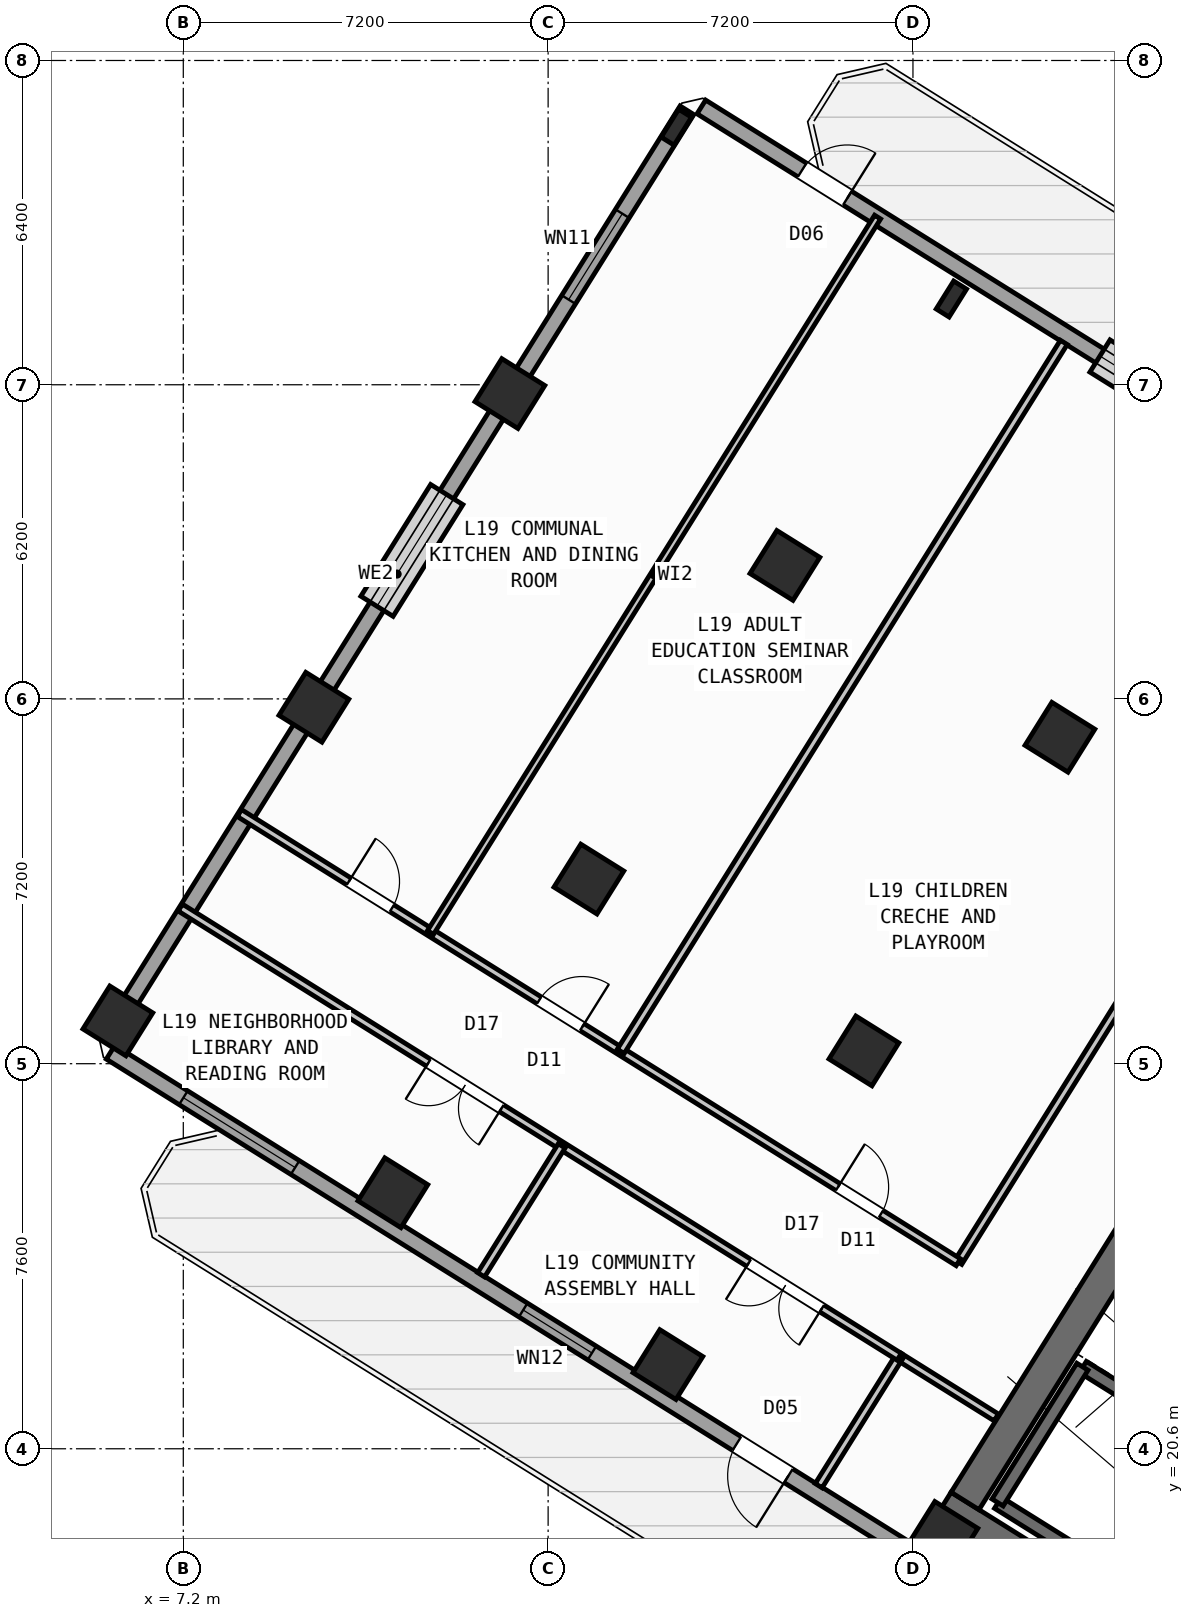
"""IFC4 building model, lengths in metres.
Left out: names, types, materials, properties, quantities, classifications, styles, units other than length and angle.
Written with IfcOpenShell. Run it as: python <this file> out.ifc"""

import sys

from ifc_helpers import new_model, si_unit, direction, frame, frame_2d, origin, origin_2d, place, context, subcontext, project, spatial, rectangle, hollow_rectangle, i_section, extrude, source, transform, mapped, element, fill, save


model = new_model("IFC4")
c1 = context("Model", 3, precision=1e-05, world=origin(), true_north=direction((0.0, 1.0)))
c2 = subcontext(c1, "Body", "Model", "MODEL_VIEW")
j1 = project(units=[si_unit("LENGTHUNIT", "METRE"), si_unit("PLANEANGLEUNIT", "RADIAN")], contexts=[c1])
p1 = place(None, origin())
s1 = spatial("IfcSite", under=j1, at=p1, CompositionType="ELEMENT")
p2 = place(p1, origin())
s2 = spatial("IfcBuilding", under=s1, at=p2, CompositionType="ELEMENT")
p3 = place(p2, frame((0.0, 0.0, 76.5)))
s3 = spatial("IfcBuildingStorey", under=s2, at=p3, CompositionType="ELEMENT", Elevation=76.5)
p4 = place(p3, frame((33.409, 12.45, 0.0), z_axis=(0.0, 0.0, 1.0), x_axis=(-0.848051132073, 0.529914405721, 0.0)))
e1 = element("IfcWall", 1, at=p4, inside=s3, PredefinedType="SHEAR", context=c2, shape_type="SweptSolid", body=[
    extrude(rectangle(XDim=13.24, YDim=0.65, at=frame_2d((6.62, 0.0))), origin(), (0.0, 0.0, 1.0), 4.25),
])
p5 = place(p3, frame((26.007, 24.976, 0.0), z_axis=(0.0, 0.0, 1.0), x_axis=(-0.529916319127, -0.848049936456, 0.0)))
e2 = element("IfcWall", 2, at=p5, inside=s3, PredefinedType="SHEAR", context=c2, shape_type="SweptSolid", body=[
    extrude(rectangle(XDim=6.375, YDim=0.65, at=frame_2d((3.188, 0.0))), origin(), (0.0, 0.0, 1.0), 4.25),
])
m1 = source(origin(), c2, "Body", "SweptSolid", [
    extrude(hollow_rectangle(XDim=1.0, YDim=1.0, WallThickness=0.04, at=origin_2d()), origin(), (0.0, 0.0, 1.0), 4.5),
])
for number, where, z_axis, x_axis in (
    (3, (22.191, 18.87, 0.0), (0.0, 0.0, 1.0), (-0.848, 0.53, 0.0)),
    (4, (24.5, 34.643, 0.0), (0.0, 0.0, 1.0), (-0.848, 0.53, 0.0)),
    (5, (20.632, 28.452, 0.0), (0.0, 0.0, 1.0), (-0.848, 0.53, 0.0)),
    (6, (16.764, 22.261, 0.0), (0.0, 0.0, 1.0), (-0.848, 0.53, 0.0)),
):
    element("IfcColumn", number, at=place(p3, frame(where, z_axis=z_axis, x_axis=x_axis)), inside=s3, PredefinedType="COLUMN", context=c2, shape_type="MappedRepresentation", body=[
        mapped(m1, transform((0.0, 0.0, 0.0), scale=1.0)),
    ])
m2 = source(origin(), c2, "Body", "SweptSolid", [
    extrude(i_section(OverallWidth=0.3, OverallDepth=0.65, WebThickness=0.016, FlangeThickness=0.031, at=origin_2d()), origin(), (0.0, 0.0, 1.0), 4.5),
])
p6 = place(p3, frame((22.358, 43.292, 0.0), z_axis=(0.0, 0.0, 1.0), x_axis=(-0.848048096156, 0.529919264233, 0.0)))
e7 = element("IfcColumn", 7, at=p6, inside=s3, PredefinedType="COLUMN", context=c2, shape_type="MappedRepresentation", body=[
    mapped(m2, transform((0.0, 0.0, 0.0), scale=1.0)),
])
for number, where, z_axis, x_axis in (
    (8, (19.073, 38.034, 0.0), (0.0, 0.0, 1.0), (-0.848, 0.53, 0.0)),
    (9, (15.205, 31.844, 0.0), (0.0, 0.0, 1.0), (-0.848, 0.53, 0.0)),
    (10, (11.336, 25.653, 0.0), (0.0, 0.0, 1.0), (-0.848, 0.53, 0.0)),
):
    element("IfcColumn", number, at=place(p3, frame(where, z_axis=z_axis, x_axis=x_axis)), inside=s3, PredefinedType="COLUMN", context=c2, shape_type="MappedRepresentation", body=[
        mapped(m1, transform((0.0, 0.0, 0.0), scale=1.0)),
    ])
p7 = place(p3, frame((16.931, 46.684, 0.0), z_axis=(0.0, 0.0, 1.0), x_axis=(-0.848048096156, 0.529919264233, 0.0)))
e11 = element("IfcColumn", 11, at=p7, inside=s3, PredefinedType="COLUMN", context=c2, shape_type="MappedRepresentation", body=[
    mapped(m2, transform((0.0, 0.0, 0.0), scale=1.0)),
])
for number, where, z_axis, x_axis in (
    (12, (13.646, 41.426, 0.0), (0.0, 0.0, 1.0), (-0.848, 0.53, 0.0)),
    (13, (9.777, 35.235, 0.0), (0.0, 0.0, 1.0), (-0.848, 0.53, 0.0)),
    (14, (5.909, 29.044, 0.0), (0.0, 0.0, 1.0), (-0.848, 0.53, 0.0)),
):
    element("IfcColumn", number, at=place(p3, frame(where, z_axis=z_axis, x_axis=x_axis)), inside=s3, PredefinedType="COLUMN", context=c2, shape_type="MappedRepresentation", body=[
        mapped(m1, transform((0.0, 0.0, 0.0), scale=1.0)),
    ])
p8 = place(p3, frame((31.76, 12.183, 0.0), z_axis=(0.0, 0.0, 1.0), x_axis=(-0.848047074256, 0.529920899612, 0.0)))
e15 = element("IfcWall", 15, at=p8, inside=s3, PredefinedType="STANDARD", context=c2, shape_type="SweptSolid", body=[
    extrude(rectangle(XDim=30.652, YDim=0.32, at=frame_2d((15.326, 0.0))), origin(), (0.0, 0.0, 1.0), 4.25),
])
p9 = place(p8, frame((14.878, 0.0, 0.0)))
e16 = element("IfcOpeningElement", 16, at=p9, cuts=e15, PredefinedType="OPENING", context=c2, shape_type="SweptSolid", body=[
    extrude(rectangle(XDim=1.2, YDim=2.15, at=frame_2d((0.6, 1.075))), frame((0.0, 0.17, 0.0), z_axis=(0.0, -1.0, 0.0), x_axis=(1.0, 0.0, 0.0)), (0.0, 0.0, 1.0), 0.34),
])
p10 = place(p8, frame((1.74, 0.0, 0.7)))
e17 = element("IfcOpeningElement", 17, at=p10, cuts=e15, PredefinedType="OPENING", context=c2, shape_type="SweptSolid", body=[
    extrude(rectangle(XDim=2.6, YDim=2.0, at=frame_2d((1.3, 1.0))), frame((0.0, 0.17, 0.0), z_axis=(0.0, -1.0, 0.0), x_axis=(1.0, 0.0, 0.0)), (0.0, 0.0, 1.0), 0.34),
])
p11 = place(p8, frame((6.919, 0.0, 0.7)))
e18 = element("IfcOpeningElement", 18, at=p11, cuts=e15, PredefinedType="OPENING", context=c2, shape_type="SweptSolid", body=[
    extrude(rectangle(XDim=2.6, YDim=2.0, at=frame_2d((1.3, 1.0))), frame((0.0, 0.17, 0.0), z_axis=(0.0, -1.0, 0.0), x_axis=(1.0, 0.0, 0.0)), (0.0, 0.0, 1.0), 0.34),
])
p12 = place(p8, frame((19.451, 0.0, 0.85)))
e19 = element("IfcOpeningElement", 19, at=p12, cuts=e15, PredefinedType="OPENING", context=c2, shape_type="SweptSolid", body=[
    extrude(rectangle(XDim=1.6, YDim=1.8, at=frame_2d((0.8, 0.9))), frame((0.0, 0.17, 0.0), z_axis=(0.0, -1.0, 0.0), x_axis=(1.0, 0.0, 0.0)), (0.0, 0.0, 1.0), 0.34),
])
p13 = place(p8, frame((26.358, 0.0, 0.7)))
e20 = element("IfcOpeningElement", 20, at=p13, cuts=e15, PredefinedType="OPENING", context=c2, shape_type="SweptSolid", body=[
    extrude(rectangle(XDim=2.6, YDim=2.0, at=frame_2d((1.3, 1.0))), frame((0.0, 0.17, 0.0), z_axis=(0.0, -1.0, 0.0), x_axis=(1.0, 0.0, 0.0)), (0.0, 0.0, 1.0), 0.34),
])
p14 = place(p3, frame((5.7, 28.71, 0.0), z_axis=(0.0, 0.0, 1.0), x_axis=(0.529923711467, 0.8480453172, 0.0)))
e21 = element("IfcWall", 21, at=p14, inside=s3, PredefinedType="STANDARD", context=c2, shape_type="SweptSolid", body=[
    extrude(rectangle(XDim=21.587, YDim=0.32, at=frame_2d((10.794, 0.0))), origin(), (0.0, 0.0, 1.0), 3.625),
])
p15 = place(p14, frame((10.044, 0.0, 0.7)))
e22 = element("IfcOpeningElement", 22, at=p15, cuts=e21, PredefinedType="OPENING", context=c2, shape_type="SweptSolid", body=[
    extrude(rectangle(XDim=2.6, YDim=2.0, at=frame_2d((1.3, 1.0))), frame((0.0, 0.17, 0.0), z_axis=(0.0, -1.0, 0.0), x_axis=(1.0, 0.0, 0.0)), (0.0, 0.0, 1.0), 0.34),
])
p16 = place(p14, frame((17.181, 0.0, 0.75)))
e23 = element("IfcOpeningElement", 23, at=p16, cuts=e21, PredefinedType="OPENING", context=c2, shape_type="SweptSolid", body=[
    extrude(rectangle(XDim=2.0, YDim=1.95, at=frame_2d((1.0, 0.975))), frame((0.0, 0.17, 0.0), z_axis=(0.0, -1.0, 0.0), x_axis=(1.0, 0.0, 0.0)), (0.0, 0.0, 1.0), 0.34),
])
p17 = place(p3, frame((17.424, 47.083, 0.0), z_axis=(0.0, 0.0, 1.0), x_axis=(0.848049927979, -0.529916332693, 0.0)))
e24 = element("IfcWall", 24, at=p17, inside=s3, PredefinedType="STANDARD", context=c2, shape_type="SweptSolid", body=[
    extrude(rectangle(XDim=29.223, YDim=0.32, at=frame_2d((14.612, 0.0))), origin(), (0.0, 0.0, 1.0), 4.25),
])
p18 = place(p17, frame((2.347, 0.0, 0.0)))
e25 = element("IfcOpeningElement", 25, at=p18, cuts=e24, PredefinedType="OPENING", context=c2, shape_type="SweptSolid", body=[
    extrude(rectangle(XDim=1.05, YDim=2.15, at=frame_2d((0.525, 1.075))), frame((0.0, 0.17, 0.0), z_axis=(0.0, -1.0, 0.0), x_axis=(1.0, 0.0, 0.0)), (0.0, 0.0, 1.0), 0.34),
])
p19 = place(p17, frame((9.276, 0.0, 0.7)))
e26 = element("IfcOpeningElement", 26, at=p19, cuts=e24, PredefinedType="OPENING", context=c2, shape_type="SweptSolid", body=[
    extrude(rectangle(XDim=2.6, YDim=2.0, at=frame_2d((1.3, 1.0))), frame((0.0, 0.17, 0.0), z_axis=(0.0, -1.0, 0.0), x_axis=(1.0, 0.0, 0.0)), (0.0, 0.0, 1.0), 0.34),
])
p20 = place(p17, frame((13.474, 0.0, 0.75)))
e27 = element("IfcOpeningElement", 27, at=p20, cuts=e24, PredefinedType="OPENING", context=c2, shape_type="SweptSolid", body=[
    extrude(rectangle(XDim=2.0, YDim=1.95, at=frame_2d((1.0, 0.975))), frame((0.0, 0.17, 0.0), z_axis=(0.0, -1.0, 0.0), x_axis=(1.0, 0.0, 0.0)), (0.0, 0.0, 1.0), 0.34),
])
p21 = place(p3, frame((29.605, 15.581, 0.0), z_axis=(0.0, 0.0, 1.0), x_axis=(-0.848036911448, 0.529937163087, 0.0)))
e28 = element("IfcWall", 28, at=p21, inside=s3, PredefinedType="SHEAR", context=c2, shape_type="SweptSolid", body=[
    extrude(rectangle(XDim=7.46, YDim=0.26, at=frame_2d((3.73, 0.0))), origin(), (0.0, 0.0, 1.0), 4.25),
])
p22 = place(p3, frame((31.28, 18.261, 0.0), z_axis=(0.0, 0.0, 1.0), x_axis=(-0.848051618787, 0.529913626805, 0.0)))
e29 = element("IfcWall", 29, at=p22, inside=s3, PredefinedType="SHEAR", context=c2, shape_type="SweptSolid", body=[
    extrude(rectangle(XDim=7.46, YDim=0.26, at=frame_2d((3.73, 0.0))), origin(), (0.0, 0.0, 1.0), 4.25),
])
p23 = place(p22, frame((0.36, 0.0, 0.0)))
e30 = element("IfcOpeningElement", 30, at=p23, cuts=e29, PredefinedType="OPENING", context=c2, shape_type="SweptSolid", body=[
    extrude(rectangle(XDim=0.86, YDim=2.05, at=frame_2d((0.43, 1.025))), frame((0.0, 0.14, 0.0), z_axis=(0.0, -1.0, 0.0), x_axis=(1.0, 0.0, 0.0)), (0.0, 0.0, 1.0), 0.28),
])
p24 = place(p3, frame((24.945, 22.22, 0.0), z_axis=(0.0, 0.0, 1.0), x_axis=(-0.529908658664, -0.84805472316, 0.0)))
e31 = element("IfcWall", 31, at=p24, inside=s3, PredefinedType="SHEAR", context=c2, shape_type="SweptSolid", body=[
    extrude(rectangle(XDim=3.16, YDim=0.26, at=frame_2d((1.58, 0.0))), origin(), (0.0, 0.0, 1.0), 4.25),
])
p25 = place(p3, frame((23.244, 21.219, 0.0), z_axis=(0.0, 0.0, 1.0), x_axis=(-0.848040823168, 0.52993090327, 0.0)))
e32 = element("IfcWall", 32, at=p25, inside=s3, PredefinedType="PARTITIONING", context=c2, shape_type="SweptSolid", body=[
    extrude(rectangle(XDim=2.258, YDim=0.16, at=frame_2d((1.129, 0.0))), origin(), (0.0, 0.0, 1.0), 4.24),
])
p26 = place(p3, frame((31.239, 38.274, 0.0), z_axis=(0.0, 0.0, 1.0), x_axis=(-0.529921796515, -0.848046513806, 0.0)))
e33 = element("IfcWall", 33, at=p26, inside=s3, PredefinedType="PARTITIONING", context=c2, shape_type="SweptSolid", body=[
    extrude(rectangle(XDim=16.5, YDim=0.16, at=frame_2d((8.25, 0.0))), origin(), (0.0, 0.0, 1.0), 4.24),
])
p27 = place(p3, frame((21.329, 22.416, 0.0), z_axis=(0.0, 0.0, 1.0), x_axis=(-0.529933104572, -0.848039447596, 0.0)))
e34 = element("IfcWall", 34, at=p27, inside=s3, PredefinedType="PARTITIONING", context=c2, shape_type="SweptSolid", body=[
    extrude(rectangle(XDim=3.0, YDim=0.16, at=frame_2d((1.5, 0.0))), origin(), (0.0, 0.0, 1.0), 4.24),
])
p28 = place(p3, frame((22.495, 24.281, 0.0), z_axis=(0.0, 0.0, 1.0), x_axis=(-0.848052408131, 0.529912363569, 0.0)))
e35 = element("IfcWall", 35, at=p28, inside=s3, PredefinedType="PARTITIONING", context=c2, shape_type="SweptSolid", body=[
    extrude(rectangle(XDim=16.73, YDim=0.16, at=frame_2d((8.365, 0.0))), origin(), (0.0, 0.0, 1.0), 4.24),
])
p29 = place(p28, frame((1.8, 0.0, 0.0)))
e36 = element("IfcOpeningElement", 36, at=p29, cuts=e35, PredefinedType="OPENING", context=c2, shape_type="SweptSolid", body=[
    extrude(rectangle(XDim=1.0, YDim=2.1, at=frame_2d((0.5, 1.05))), frame((0.0, 0.09, 0.0), z_axis=(0.0, -1.0, 0.0), x_axis=(1.0, 0.0, 0.0)), (0.0, 0.0, 1.0), 0.18),
])
p30 = place(p28, frame((8.755, 0.0, 0.0)))
e37 = element("IfcOpeningElement", 37, at=p30, cuts=e35, PredefinedType="OPENING", context=c2, shape_type="SweptSolid", body=[
    extrude(rectangle(XDim=1.0, YDim=2.1, at=frame_2d((0.5, 1.05))), frame((0.0, 0.09, 0.0), z_axis=(0.0, -1.0, 0.0), x_axis=(1.0, 0.0, 0.0)), (0.0, 0.0, 1.0), 0.18),
])
p31 = place(p28, frame((13.182, 0.0, 0.0)))
e38 = element("IfcOpeningElement", 38, at=p31, cuts=e35, PredefinedType="OPENING", context=c2, shape_type="SweptSolid", body=[
    extrude(rectangle(XDim=1.0, YDim=2.1, at=frame_2d((0.5, 1.05))), frame((0.0, 0.09, 0.0), z_axis=(0.0, -1.0, 0.0), x_axis=(1.0, 0.0, 0.0)), (0.0, 0.0, 1.0), 0.18),
])
p32 = place(p3, frame((21.329, 22.416, 0.0), z_axis=(0.0, 0.0, 1.0), x_axis=(-0.848052408131, 0.529912363569, 0.0)))
e39 = element("IfcWall", 39, at=p32, inside=s3, PredefinedType="PARTITIONING", context=c2, shape_type="SweptSolid", body=[
    extrude(rectangle(XDim=16.73, YDim=0.16, at=frame_2d((8.365, 0.0))), origin(), (0.0, 0.0, 1.0), 4.24),
])
p33 = place(p32, frame((1.8, 0.0, 0.0)))
e40 = element("IfcOpeningElement", 40, at=p33, cuts=e39, PredefinedType="OPENING", context=c2, shape_type="SweptSolid", body=[
    extrude(rectangle(XDim=1.7, YDim=2.2, at=frame_2d((0.85, 1.1))), frame((0.0, 0.09, 0.0), z_axis=(0.0, -1.0, 0.0), x_axis=(1.0, 0.0, 0.0)), (0.0, 0.0, 1.0), 0.18),
])
p34 = place(p32, frame((9.255, 0.0, 0.0)))
e41 = element("IfcOpeningElement", 41, at=p34, cuts=e39, PredefinedType="OPENING", context=c2, shape_type="SweptSolid", body=[
    extrude(rectangle(XDim=1.7, YDim=2.2, at=frame_2d((0.85, 1.1))), frame((0.0, 0.09, 0.0), z_axis=(0.0, -1.0, 0.0), x_axis=(1.0, 0.0, 0.0)), (0.0, 0.0, 1.0), 0.18),
])
p35 = place(p3, frame((14.667, 26.578, 0.0), z_axis=(0.0, 0.0, 1.0), x_axis=(-0.529911148873, -0.848053167142, 0.0)))
e42 = element("IfcWall", 42, at=p35, inside=s3, PredefinedType="PARTITIONING", context=c2, shape_type="SweptSolid", body=[
    extrude(rectangle(XDim=3.0, YDim=0.16, at=frame_2d((1.5, 0.0))), origin(), (0.0, 0.0, 1.0), 3.895),
])
p36 = place(p3, frame((24.577, 42.437, 0.0), z_axis=(0.0, 0.0, 1.0), x_axis=(-0.52991514706, -0.848050668838, 0.0)))
e43 = element("IfcWall", 43, at=p36, inside=s3, PredefinedType="PARTITIONING", context=c2, shape_type="SweptSolid", body=[
    extrude(rectangle(XDim=16.5, YDim=0.16, at=frame_2d((8.25, 0.0))), origin(), (0.0, 0.0, 1.0), 3.895),
])
p37 = place(p3, frame((20.902, 44.91, 0.0), z_axis=(0.0, 0.0, 1.0), x_axis=(-0.529919856494, -0.848047726071, 0.0)))
e44 = element("IfcWall", 44, at=p37, inside=s3, PredefinedType="PLUMBINGWALL", context=c2, shape_type="SweptSolid", body=[
    extrude(rectangle(XDim=16.65, YDim=0.14, at=frame_2d((8.325, 0.0))), origin(), (0.0, 0.0, 1.0), 3.895),
])
m3 = source(origin(), c2, "Body", "SweptSolid", [
    extrude(rectangle(XDim=1.2, YDim=2.15, at=frame_2d((0.6, 1.075))), frame((0.0, 0.025, 0.0), z_axis=(0.0, -1.0, 0.0), x_axis=(1.0, 0.0, 0.0)), (0.0, 0.0, 1.0), 0.05),
])
p38 = place(p9, origin())
e45 = element("IfcDoor", 45, at=p38, inside=s3, OperationType="SINGLE_SWING_LEFT", PredefinedType="DOOR", context=c2, shape_type="MappedRepresentation", body=[
    mapped(m3, transform((0.0, 0.0, 0.0), scale=1.0)),
])
fill(e16, e45)
m4 = source(origin(), c2, "Body", "SweptSolid", [
    extrude(rectangle(XDim=1.05, YDim=2.15, at=frame_2d((0.525, 1.075))), frame((0.0, 0.025, 0.0), z_axis=(0.0, -1.0, 0.0), x_axis=(1.0, 0.0, 0.0)), (0.0, 0.0, 1.0), 0.05),
])
p39 = place(p18, origin())
e46 = element("IfcDoor", 46, at=p39, inside=s3, OperationType="SINGLE_SWING_RIGHT", PredefinedType="DOOR", context=c2, shape_type="MappedRepresentation", body=[
    mapped(m4, transform((0.0, 0.0, 0.0), scale=1.0)),
])
fill(e25, e46)
m5 = source(origin(), c2, "Body", "SweptSolid", [
    extrude(rectangle(XDim=1.6, YDim=1.8, at=frame_2d((0.8, 0.9))), frame((0.0, 0.03, 0.0), z_axis=(0.0, -1.0, 0.0), x_axis=(1.0, 0.0, 0.0)), (0.0, 0.0, 1.0), 0.06),
])
p40 = place(p12, origin())
e47 = element("IfcWindow", 47, at=p40, inside=s3, PartitioningType="SINGLE_PANEL", PredefinedType="WINDOW", context=c2, shape_type="MappedRepresentation", body=[
    mapped(m5, transform((0.0, 0.0, 0.0), scale=1.0)),
])
fill(e19, e47)
m6 = source(origin(), c2, "Body", "SweptSolid", [
    extrude(rectangle(XDim=2.6, YDim=2.0, at=frame_2d((1.3, 1.0))), frame((0.0, 0.03, 0.0), z_axis=(0.0, -1.0, 0.0), x_axis=(1.0, 0.0, 0.0)), (0.0, 0.0, 1.0), 0.06),
])
p41 = place(p13, origin())
e48 = element("IfcWindow", 48, at=p41, inside=s3, PartitioningType="SINGLE_PANEL", PredefinedType="WINDOW", context=c2, shape_type="MappedRepresentation", body=[
    mapped(m6, transform((0.0, 0.0, 0.0), scale=1.0)),
])
fill(e20, e48)
p42 = place(p15, origin())
e49 = element("IfcWindow", 49, at=p42, inside=s3, PartitioningType="SINGLE_PANEL", PredefinedType="WINDOW", context=c2, shape_type="MappedRepresentation", body=[
    mapped(m6, transform((0.0, 0.0, 0.0), scale=1.0)),
])
fill(e22, e49)
m7 = source(origin(), c2, "Body", "SweptSolid", [
    extrude(rectangle(XDim=2.0, YDim=1.95, at=frame_2d((1.0, 0.975))), frame((0.0, 0.03, 0.0), z_axis=(0.0, -1.0, 0.0), x_axis=(1.0, 0.0, 0.0)), (0.0, 0.0, 1.0), 0.06),
])
p43 = place(p16, origin())
e50 = element("IfcWindow", 50, at=p43, inside=s3, PartitioningType="SINGLE_PANEL", PredefinedType="WINDOW", context=c2, shape_type="MappedRepresentation", body=[
    mapped(m7, transform((0.0, 0.0, 0.0), scale=1.0)),
])
fill(e23, e50)
p44 = place(p19, origin())
e51 = element("IfcWindow", 51, at=p44, inside=s3, PartitioningType="SINGLE_PANEL", PredefinedType="WINDOW", context=c2, shape_type="MappedRepresentation", body=[
    mapped(m6, transform((0.0, 0.0, 0.0), scale=1.0)),
])
fill(e26, e51)
m8 = source(origin(), c2, "Body", "SweptSolid", [
    extrude(rectangle(XDim=1.7, YDim=2.2, at=frame_2d((0.85, 1.1))), frame((0.0, 0.025, 0.0), z_axis=(0.0, -1.0, 0.0), x_axis=(1.0, 0.0, 0.0)), (0.0, 0.0, 1.0), 0.05),
])
p45 = place(p33, origin())
e52 = element("IfcDoor", 52, at=p45, inside=s3, OperationType="DOUBLE_DOOR_SINGLE_SWING", PredefinedType="DOOR", context=c2, shape_type="MappedRepresentation", body=[
    mapped(m8, transform((0.0, 0.0, 0.0), scale=1.0)),
])
fill(e40, e52)
p46 = place(p34, origin())
e53 = element("IfcDoor", 53, at=p46, inside=s3, OperationType="DOUBLE_DOOR_SINGLE_SWING", PredefinedType="DOOR", context=c2, shape_type="MappedRepresentation", body=[
    mapped(m8, transform((0.0, 0.0, 0.0), scale=1.0)),
])
fill(e41, e53)
m9 = source(origin(), c2, "Body", "SweptSolid", [
    extrude(rectangle(XDim=1.0, YDim=2.1, at=frame_2d((0.5, 1.05))), frame((0.0, 0.025, 0.0), z_axis=(0.0, -1.0, 0.0), x_axis=(1.0, 0.0, 0.0)), (0.0, 0.0, 1.0), 0.05),
])
p47 = place(p29, frame((1.0, 0.0, 0.0), z_axis=(0.0, 0.0, 1.0), x_axis=(-1.0, 0.0, 0.0)))
e54 = element("IfcDoor", 54, at=p47, inside=s3, OperationType="SINGLE_SWING_LEFT", PredefinedType="DOOR", context=c2, shape_type="MappedRepresentation", body=[
    mapped(m9, transform((0.0, 0.0, 0.0), scale=1.0)),
])
fill(e36, e54)
p48 = place(p30, frame((1.0, 0.0, 0.0), z_axis=(0.0, 0.0, 1.0), x_axis=(-1.0, 0.0, 0.0)))
e55 = element("IfcDoor", 55, at=p48, inside=s3, OperationType="SINGLE_SWING_RIGHT", PredefinedType="DOOR", context=c2, shape_type="MappedRepresentation", body=[
    mapped(m9, transform((0.0, 0.0, 0.0), scale=1.0)),
])
fill(e37, e55)
p49 = place(p31, frame((1.0, 0.0, 0.0), z_axis=(0.0, 0.0, 1.0), x_axis=(-1.0, 0.0, 0.0)))
e56 = element("IfcDoor", 56, at=p49, inside=s3, OperationType="SINGLE_SWING_LEFT", PredefinedType="DOOR", context=c2, shape_type="MappedRepresentation", body=[
    mapped(m9, transform((0.0, 0.0, 0.0), scale=1.0)),
])
fill(e38, e56)
save(model, sys.argv[1])
